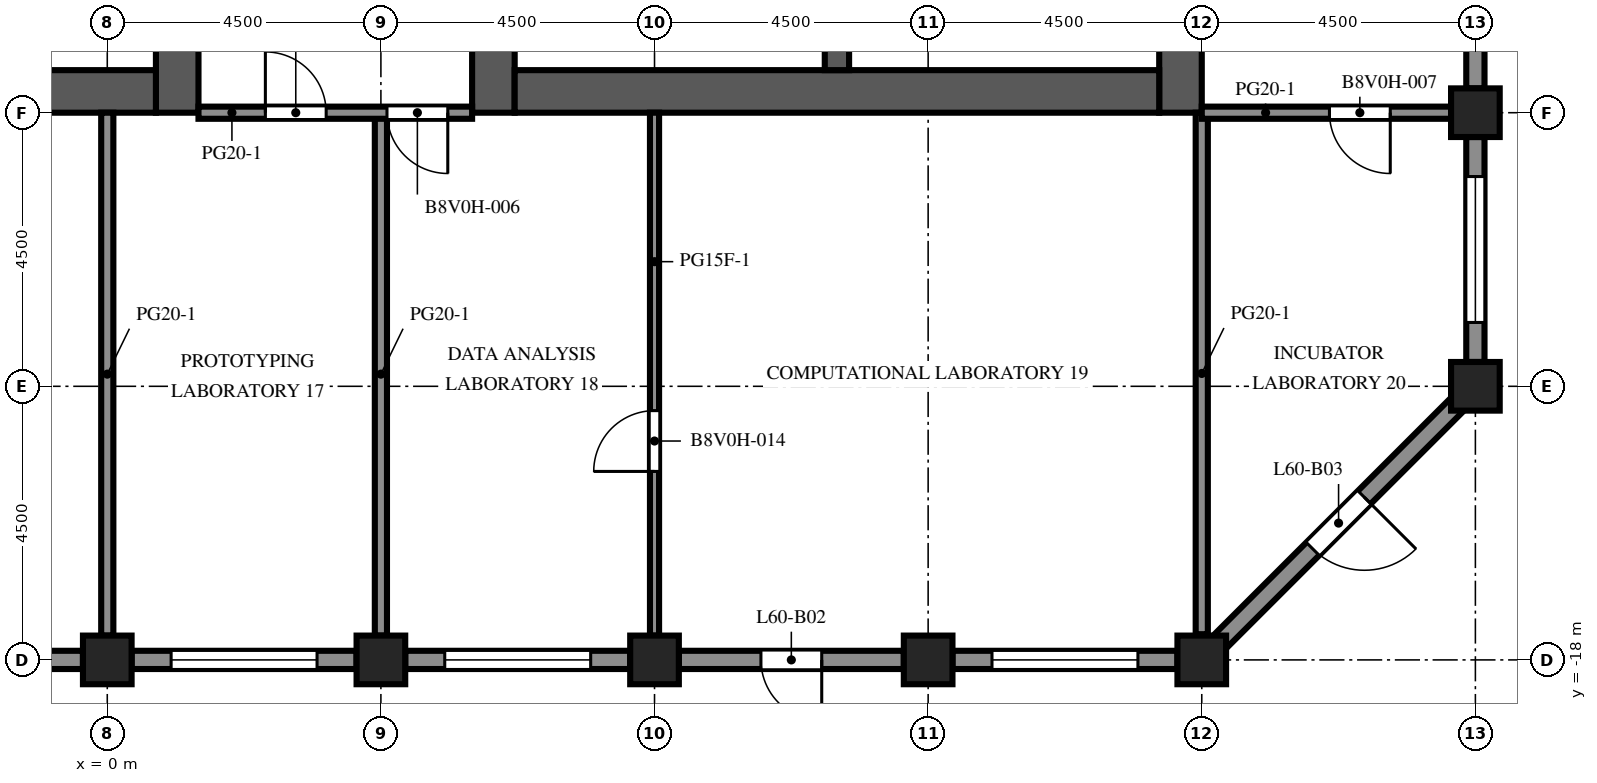
"""IFC4 building model, lengths in metres.
Left out: names, types, materials, properties, quantities, classifications, styles, units other than length and angle.
Written with IfcOpenShell. Run it as: python <this file> out.ifc"""

import sys

from ifc_helpers import new_model, si_unit, direction, frame, frame_2d, origin, origin_2d, place, context, subcontext, project, spatial, rectangle, extrude, element, fill, save


model = new_model("IFC4")
c1 = context("Model", 3, precision=1e-05, world=origin(), true_north=direction((0.0, 1.0)))
c2 = subcontext(c1, "Body", "Model", "MODEL_VIEW")
j1 = project(units=[si_unit("LENGTHUNIT", "METRE"), si_unit("PLANEANGLEUNIT", "RADIAN")], contexts=[c1])
p1 = place(None, origin())
s1 = spatial("IfcSite", under=j1, at=p1, CompositionType="ELEMENT")
p2 = place(p1, origin())
s2 = spatial("IfcBuilding", under=s1, at=p2, CompositionType="ELEMENT")
p3 = place(p2, frame((0.0, 0.0, 266.3)))
s3 = spatial("IfcBuildingStorey", under=s2, at=p3, CompositionType="ELEMENT", Elevation=266.3)
for number, where, z_axis, x_axis in (
    (1, (0.0, -18.0, -0.45), (0.0, 0.0, 1.0), (1.0, 0.0, 0.0)),
    (2, (4.5, -18.0, -0.45), (0.0, 0.0, 1.0), (1.0, 0.0, 0.0)),
    (3, (9.0, -18.0, -0.45), (0.0, 0.0, 1.0), (1.0, 0.0, 0.0)),
    (4, (13.5, -18.0, -0.45), (0.0, 0.0, 1.0), (1.0, 0.0, 0.0)),
    (5, (18.0, -18.0, -0.45), (0.0, 0.0, 1.0), (1.0, 0.0, 0.0)),
    (6, (22.5, -13.5, -0.45), (0.0, 0.0, 1.0), (1.0, 0.0, 0.0)),
    (7, (22.5, -9.0, -0.45), (0.0, 0.0, 1.0), (1.0, 0.0, 0.0)),
):
    element("IfcColumn", number, at=place(p3, frame(where, z_axis=z_axis, x_axis=x_axis)), inside=s3, PredefinedType="COLUMN", context=c2, shape_type="SweptSolid", body=[
        extrude(rectangle(XDim=0.8, YDim=0.8, at=origin_2d()), origin(), (0.0, 0.0, 1.0), 4.55),
    ])
p4 = place(p3, frame((1.15, -9.0, 0.0), z_axis=(0.0, 0.0, 1.0), x_axis=(0.0, 1.0, 0.0)))
e8 = element("IfcWall", 8, at=p4, inside=s3, PredefinedType="SHEAR", context=c2, shape_type="SweptSolid", body=[
    extrude(rectangle(XDim=27.5, YDim=0.7, at=frame_2d((13.75, 0.0))), origin(), (0.0, 0.0, 1.0), 4.1),
])
p5 = place(p4, frame((12.55, 0.0, 0.0)))
e9 = element("IfcOpeningElement", 9, at=p5, cuts=e8, PredefinedType="OPENING", context=c2, shape_type="SweptSolid", body=[
    extrude(rectangle(XDim=2.4, YDim=2.4, at=frame_2d((1.2, 1.2))), frame((0.0, 0.36, 0.0), z_axis=(0.0, -1.0, 0.0), x_axis=(1.0, 0.0, 0.0)), (0.0, 0.0, 1.0), 0.72),
])
p6 = place(p4, frame((3.788, 0.0, 0.0)))
e10 = element("IfcOpeningElement", 10, at=p6, cuts=e8, PredefinedType="OPENING", context=c2, shape_type="SweptSolid", body=[
    extrude(rectangle(XDim=0.968, YDim=2.1, at=frame_2d((0.484, 1.05))), frame((0.0, 0.36, 0.0), z_axis=(0.0, -1.0, 0.0), x_axis=(1.0, 0.0, 0.0)), (0.0, 0.0, 1.0), 0.72),
])
p7 = place(p4, frame((23.54, 0.0, 0.0)))
e11 = element("IfcOpeningElement", 11, at=p7, cuts=e8, PredefinedType="OPENING", context=c2, shape_type="SweptSolid", body=[
    extrude(rectangle(XDim=1.2, YDim=2.1, at=frame_2d((0.6, 1.05))), frame((0.0, 0.36, 0.0), z_axis=(0.0, -1.0, 0.0), x_axis=(1.0, 0.0, 0.0)), (0.0, 0.0, 1.0), 0.72),
])
p8 = place(p3, frame((-9.8, -8.65, 0.0), z_axis=(0.0, 0.0, 1.0), x_axis=(1.0, 0.0, 0.0)))
e12 = element("IfcWall", 12, at=p8, inside=s3, PredefinedType="SHEAR", context=c2, shape_type="SweptSolid", body=[
    extrude(rectangle(XDim=10.6, YDim=0.7, at=frame_2d((5.3, 0.0))), origin(), (0.0, 0.0, 1.0), 4.1),
])
p9 = place(p3, frame((6.35, -9.0, 0.0), z_axis=(0.0, 0.0, 1.0), x_axis=(0.0, 1.0, 0.0)))
e13 = element("IfcWall", 13, at=p9, inside=s3, PredefinedType="SHEAR", context=c2, shape_type="SweptSolid", body=[
    extrude(rectangle(XDim=27.5, YDim=0.7, at=frame_2d((13.75, 0.0))), origin(), (0.0, 0.0, 1.0), 4.1),
])
p10 = place(p9, frame((12.55, 0.0, 0.0)))
e14 = element("IfcOpeningElement", 14, at=p10, cuts=e13, PredefinedType="OPENING", context=c2, shape_type="SweptSolid", body=[
    extrude(rectangle(XDim=2.4, YDim=2.4, at=frame_2d((1.2, 1.2))), frame((0.0, 0.36, 0.0), z_axis=(0.0, -1.0, 0.0), x_axis=(1.0, 0.0, 0.0)), (0.0, 0.0, 1.0), 0.72),
])
p11 = place(p9, frame((3.788, 0.0, 0.0)))
e15 = element("IfcOpeningElement", 15, at=p11, cuts=e13, PredefinedType="OPENING", context=c2, shape_type="SweptSolid", body=[
    extrude(rectangle(XDim=0.968, YDim=2.1, at=frame_2d((0.484, 1.05))), frame((0.0, 0.36, 0.0), z_axis=(0.0, -1.0, 0.0), x_axis=(1.0, 0.0, 0.0)), (0.0, 0.0, 1.0), 0.72),
])
p12 = place(p9, frame((23.54, 0.0, 0.0)))
e16 = element("IfcOpeningElement", 16, at=p12, cuts=e13, PredefinedType="OPENING", context=c2, shape_type="SweptSolid", body=[
    extrude(rectangle(XDim=1.2, YDim=2.1, at=frame_2d((0.6, 1.05))), frame((0.0, 0.36, 0.0), z_axis=(0.0, -1.0, 0.0), x_axis=(1.0, 0.0, 0.0)), (0.0, 0.0, 1.0), 0.72),
])
p13 = place(p3, frame((17.65, -9.0, 0.0), z_axis=(0.0, 0.0, 1.0), x_axis=(0.0, 1.0, 0.0)))
e17 = element("IfcWall", 17, at=p13, inside=s3, PredefinedType="SHEAR", context=c2, shape_type="SweptSolid", body=[
    extrude(rectangle(XDim=27.5, YDim=0.7, at=frame_2d((13.75, 0.0))), origin(), (0.0, 0.0, 1.0), 4.1),
])
p14 = place(p13, frame((12.55, 0.0, 0.0)))
e18 = element("IfcOpeningElement", 18, at=p14, cuts=e17, PredefinedType="OPENING", context=c2, shape_type="SweptSolid", body=[
    extrude(rectangle(XDim=2.4, YDim=2.4, at=frame_2d((1.2, 1.2))), frame((0.0, 0.36, 0.0), z_axis=(0.0, -1.0, 0.0), x_axis=(1.0, 0.0, 0.0)), (0.0, 0.0, 1.0), 0.72),
])
p15 = place(p13, frame((6.825, 0.0, 0.0)))
e19 = element("IfcOpeningElement", 19, at=p15, cuts=e17, PredefinedType="OPENING", context=c2, shape_type="SweptSolid", body=[
    extrude(rectangle(XDim=1.2, YDim=2.1, at=frame_2d((0.6, 1.05))), frame((0.0, 0.36, 0.0), z_axis=(0.0, -1.0, 0.0), x_axis=(1.0, 0.0, 0.0)), (0.0, 0.0, 1.0), 0.72),
])
p16 = place(p13, frame((19.475, 0.0, 0.0)))
e20 = element("IfcOpeningElement", 20, at=p16, cuts=e17, PredefinedType="OPENING", context=c2, shape_type="SweptSolid", body=[
    extrude(rectangle(XDim=1.2, YDim=2.1, at=frame_2d((0.6, 1.05))), frame((0.0, 0.36, 0.0), z_axis=(0.0, -1.0, 0.0), x_axis=(1.0, 0.0, 0.0)), (0.0, 0.0, 1.0), 0.72),
])
p17 = place(p3, frame((6.7, -8.65, 0.0), z_axis=(0.0, 0.0, 1.0), x_axis=(1.0, 0.0, 0.0)))
e21 = element("IfcWall", 21, at=p17, inside=s3, PredefinedType="SHEAR", context=c2, shape_type="SweptSolid", body=[
    extrude(rectangle(XDim=10.6, YDim=0.7, at=frame_2d((5.3, 0.0))), origin(), (0.0, 0.0, 1.0), 4.1),
])
p18 = place(p3, frame((12.0, -8.3, 0.0), z_axis=(0.0, 0.0, 1.0), x_axis=(0.0, 1.0, 0.0)))
e22 = element("IfcWall", 22, at=p18, inside=s3, PredefinedType="SHEAR", context=c2, shape_type="SweptSolid", body=[
    extrude(rectangle(XDim=7.6, YDim=0.4, at=frame_2d((3.8, 0.0))), origin(), (0.0, 0.0, 1.0), 4.1),
])
p19 = place(p3, frame((-0.4, -18.0, 0.0), z_axis=(0.0, 0.0, 1.0), x_axis=(-1.0, 0.0, 0.0)))
e23 = element("IfcWall", 23, at=p19, inside=s3, PredefinedType="SOLIDWALL", context=c2, shape_type="SweptSolid", body=[
    extrude(rectangle(XDim=3.7, YDim=0.3, at=frame_2d((1.85, 0.0))), origin(), (0.0, 0.0, 1.0), 2.85),
])
p20 = place(p19, frame((0.65, 0.0, 0.8)))
e24 = element("IfcOpeningElement", 24, at=p20, cuts=e23, PredefinedType="OPENING", context=c2, shape_type="SweptSolid", body=[
    extrude(rectangle(XDim=2.4, YDim=1.7, at=frame_2d((1.2, 0.85))), frame((0.0, 0.16, 0.0), z_axis=(0.0, -1.0, 0.0), x_axis=(1.0, 0.0, 0.0)), (0.0, 0.0, 1.0), 0.32),
])
p21 = place(p3, frame((4.1, -18.0, 0.0), z_axis=(0.0, 0.0, 1.0), x_axis=(-1.0, 0.0, 0.0)))
e25 = element("IfcWall", 25, at=p21, inside=s3, PredefinedType="SOLIDWALL", context=c2, shape_type="SweptSolid", body=[
    extrude(rectangle(XDim=3.7, YDim=0.3, at=frame_2d((1.85, 0.0))), origin(), (0.0, 0.0, 1.0), 2.85),
])
p22 = place(p21, frame((0.65, 0.0, 0.8)))
e26 = element("IfcOpeningElement", 26, at=p22, cuts=e25, PredefinedType="OPENING", context=c2, shape_type="SweptSolid", body=[
    extrude(rectangle(XDim=2.4, YDim=1.7, at=frame_2d((1.2, 0.85))), frame((0.0, 0.16, 0.0), z_axis=(0.0, -1.0, 0.0), x_axis=(1.0, 0.0, 0.0)), (0.0, 0.0, 1.0), 0.32),
])
p23 = place(p3, frame((8.6, -18.0, 0.0), z_axis=(0.0, 0.0, 1.0), x_axis=(-1.0, 0.0, 0.0)))
e27 = element("IfcWall", 27, at=p23, inside=s3, PredefinedType="SOLIDWALL", context=c2, shape_type="SweptSolid", body=[
    extrude(rectangle(XDim=3.7, YDim=0.3, at=frame_2d((1.85, 0.0))), origin(), (0.0, 0.0, 1.0), 2.85),
])
p24 = place(p23, frame((0.65, 0.0, 0.8)))
e28 = element("IfcOpeningElement", 28, at=p24, cuts=e27, PredefinedType="OPENING", context=c2, shape_type="SweptSolid", body=[
    extrude(rectangle(XDim=2.4, YDim=1.7, at=frame_2d((1.2, 0.85))), frame((0.0, 0.16, 0.0), z_axis=(0.0, -1.0, 0.0), x_axis=(1.0, 0.0, 0.0)), (0.0, 0.0, 1.0), 0.32),
])
p25 = place(p3, frame((13.1, -18.0, 0.0), z_axis=(0.0, 0.0, 1.0), x_axis=(-1.0, 0.0, 0.0)))
e29 = element("IfcWall", 29, at=p25, inside=s3, PredefinedType="SOLIDWALL", context=c2, shape_type="SweptSolid", body=[
    extrude(rectangle(XDim=3.7, YDim=0.3, at=frame_2d((1.85, 0.0))), origin(), (0.0, 0.0, 1.0), 2.85),
])
p26 = place(p25, frame((1.35, 0.0, 0.0)))
e30 = element("IfcOpeningElement", 30, at=p26, cuts=e29, PredefinedType="OPENING", context=c2, shape_type="SweptSolid", body=[
    extrude(rectangle(XDim=1.0, YDim=2.2, at=frame_2d((0.5, 1.1))), frame((0.0, 0.16, 0.0), z_axis=(0.0, -1.0, 0.0), x_axis=(1.0, 0.0, 0.0)), (0.0, 0.0, 1.0), 0.32),
])
p27 = place(p3, frame((17.6, -18.0, 0.0), z_axis=(0.0, 0.0, 1.0), x_axis=(-1.0, 0.0, 0.0)))
e31 = element("IfcWall", 31, at=p27, inside=s3, PredefinedType="SOLIDWALL", context=c2, shape_type="SweptSolid", body=[
    extrude(rectangle(XDim=3.7, YDim=0.3, at=frame_2d((1.85, 0.0))), origin(), (0.0, 0.0, 1.0), 2.85),
])
p28 = place(p27, frame((0.65, 0.0, 0.8)))
e32 = element("IfcOpeningElement", 32, at=p28, cuts=e31, PredefinedType="OPENING", context=c2, shape_type="SweptSolid", body=[
    extrude(rectangle(XDim=2.4, YDim=1.7, at=frame_2d((1.2, 0.85))), frame((0.0, 0.16, 0.0), z_axis=(0.0, -1.0, 0.0), x_axis=(1.0, 0.0, 0.0)), (0.0, 0.0, 1.0), 0.32),
])
p29 = place(p3, frame((22.206, -13.794, 0.0), z_axis=(0.0, 0.0, 1.0), x_axis=(-0.707106781187, -0.707106781187, 0.0)))
e33 = element("IfcWall", 33, at=p29, inside=s3, PredefinedType="SOLIDWALL", context=c2, shape_type="SweptSolid", body=[
    extrude(rectangle(XDim=5.532, YDim=0.3, at=frame_2d((2.766, 0.0))), origin(), (0.0, 0.0, 1.0), 2.85),
])
p30 = place(p29, frame((2.166, 0.0, 0.0)))
e34 = element("IfcOpeningElement", 34, at=p30, cuts=e33, PredefinedType="OPENING", context=c2, shape_type="SweptSolid", body=[
    extrude(rectangle(XDim=1.2, YDim=2.2, at=frame_2d((0.6, 1.1))), frame((0.0, 0.16, 0.0), z_axis=(0.0, -1.0, 0.0), x_axis=(1.0, 0.0, 0.0)), (0.0, 0.0, 1.0), 0.32),
])
p31 = place(p3, frame((22.5, -9.4, 0.0), z_axis=(0.0, 0.0, 1.0), x_axis=(0.0, -1.0, 0.0)))
e35 = element("IfcWall", 35, at=p31, inside=s3, PredefinedType="SOLIDWALL", context=c2, shape_type="SweptSolid", body=[
    extrude(rectangle(XDim=3.7, YDim=0.3, at=frame_2d((1.85, 0.0))), origin(), (0.0, 0.0, 1.0), 2.85),
])
p32 = place(p31, frame((0.65, 0.0, 0.8)))
e36 = element("IfcOpeningElement", 36, at=p32, cuts=e35, PredefinedType="OPENING", context=c2, shape_type="SweptSolid", body=[
    extrude(rectangle(XDim=2.4, YDim=1.7, at=frame_2d((1.2, 0.85))), frame((0.0, 0.16, 0.0), z_axis=(0.0, -1.0, 0.0), x_axis=(1.0, 0.0, 0.0)), (0.0, 0.0, 1.0), 0.32),
])
p33 = place(p3, frame((22.5, -4.9, 0.0), z_axis=(0.0, 0.0, 1.0), x_axis=(0.0, -1.0, 0.0)))
e37 = element("IfcWall", 37, at=p33, inside=s3, PredefinedType="SOLIDWALL", context=c2, shape_type="SweptSolid", body=[
    extrude(rectangle(XDim=3.7, YDim=0.3, at=frame_2d((1.85, 0.0))), origin(), (0.0, 0.0, 1.0), 2.85),
])
p34 = place(p33, frame((1.35, 0.0, 0.0)))
e38 = element("IfcOpeningElement", 38, at=p34, cuts=e37, PredefinedType="OPENING", context=c2, shape_type="SweptSolid", body=[
    extrude(rectangle(XDim=1.0, YDim=2.2, at=frame_2d((0.5, 1.1))), frame((0.0, 0.16, 0.0), z_axis=(0.0, -1.0, 0.0), x_axis=(1.0, 0.0, 0.0)), (0.0, 0.0, 1.0), 0.32),
])
for number, where, z_axis, x_axis in (
    (39, (0.0, -17.6, 0.0), (0.0, 0.0, 1.0), (0.0, 1.0, 0.0)),
    (40, (4.5, -17.6, 0.0), (0.0, 0.0, 1.0), (0.0, 1.0, 0.0)),
):
    element("IfcWall", number, at=place(p3, frame(where, z_axis=z_axis, x_axis=x_axis)), inside=s3, PredefinedType="PARTITIONING", context=c2, shape_type="SweptSolid", body=[
        extrude(rectangle(XDim=8.6, YDim=0.2, at=frame_2d((4.3, 0.0))), origin(), (0.0, 0.0, 1.0), 3.65),
    ])
p35 = place(p3, frame((9.0, -9.0, 0.0), z_axis=(0.0, 0.0, 1.0), x_axis=(0.0, -1.0, 0.0)))
e41 = element("IfcWall", 41, at=p35, inside=s3, PredefinedType="PARTITIONING", context=c2, shape_type="SweptSolid", body=[
    extrude(rectangle(XDim=8.6, YDim=0.15, at=frame_2d((4.3, 0.0))), origin(), (0.0, 0.0, 1.0), 3.65),
])
p36 = place(p35, frame((4.9, 0.0, 0.0)))
e42 = element("IfcOpeningElement", 42, at=p36, cuts=e41, PredefinedType="OPENING", context=c2, shape_type="SweptSolid", body=[
    extrude(rectangle(XDim=1.0, YDim=2.1, at=frame_2d((0.5, 1.05))), frame((0.0, 0.085, 0.0), z_axis=(0.0, -1.0, 0.0), x_axis=(1.0, 0.0, 0.0)), (0.0, 0.0, 1.0), 0.17),
])
p37 = place(p3, frame((18.0, -17.577, 0.0), z_axis=(0.0, 0.0, 1.0), x_axis=(0.0, 1.0, 0.0)))
e43 = element("IfcWall", 43, at=p37, inside=s3, PredefinedType="PARTITIONING", context=c2, shape_type="SweptSolid", body=[
    extrude(rectangle(XDim=8.577, YDim=0.2, at=frame_2d((4.289, 0.0))), origin(), (0.0, 0.0, 1.0), 3.65),
])
p38 = place(p3, frame((6.0, -9.0, 0.0), z_axis=(0.0, 0.0, 1.0), x_axis=(-1.0, 0.0, 0.0)))
e44 = element("IfcWall", 44, at=p38, inside=s3, PredefinedType="PARTITIONING", context=c2, shape_type="SweptSolid", body=[
    extrude(rectangle(XDim=4.5, YDim=0.2, at=frame_2d((2.25, 0.0))), origin(), (0.0, 0.0, 1.0), 3.65),
])
p39 = place(p38, frame((2.4, 0.0, 0.0)))
e45 = element("IfcOpeningElement", 45, at=p39, cuts=e44, PredefinedType="OPENING", context=c2, shape_type="SweptSolid", body=[
    extrude(rectangle(XDim=1.0, YDim=2.1, at=frame_2d((0.5, 1.05))), frame((0.0, 0.11, 0.0), z_axis=(0.0, -1.0, 0.0), x_axis=(1.0, 0.0, 0.0)), (0.0, 0.0, 1.0), 0.22),
])
p40 = place(p38, frame((0.4, 0.0, 0.0)))
e46 = element("IfcOpeningElement", 46, at=p40, cuts=e44, PredefinedType="OPENING", context=c2, shape_type="SweptSolid", body=[
    extrude(rectangle(XDim=1.0, YDim=2.1, at=frame_2d((0.5, 1.05))), frame((0.0, 0.11, 0.0), z_axis=(0.0, -1.0, 0.0), x_axis=(1.0, 0.0, 0.0)), (0.0, 0.0, 1.0), 0.22),
])
p41 = place(p3, frame((22.1, -9.0, 0.0), z_axis=(0.0, 0.0, 1.0), x_axis=(-1.0, 0.0, 0.0)))
e47 = element("IfcWall", 47, at=p41, inside=s3, PredefinedType="PARTITIONING", context=c2, shape_type="SweptSolid", body=[
    extrude(rectangle(XDim=4.1, YDim=0.2, at=frame_2d((2.05, 0.0))), origin(), (0.0, 0.0, 1.0), 3.65),
])
p42 = place(p41, frame((1.0, 0.0, 0.0)))
e48 = element("IfcOpeningElement", 48, at=p42, cuts=e47, PredefinedType="OPENING", context=c2, shape_type="SweptSolid", body=[
    extrude(rectangle(XDim=1.0, YDim=2.1, at=frame_2d((0.5, 1.05))), frame((0.0, 0.11, 0.0), z_axis=(0.0, -1.0, 0.0), x_axis=(1.0, 0.0, 0.0)), (0.0, 0.0, 1.0), 0.22),
])
p43 = place(p22, origin())
e49 = element("IfcWindow", 49, at=p43, inside=s3, PartitioningType="SINGLE_PANEL", PredefinedType="WINDOW", context=c2, shape_type="SweptSolid", body=[
    extrude(rectangle(XDim=2.4, YDim=1.7, at=frame_2d((1.2, 0.85))), frame((0.0, 0.03, 0.0), z_axis=(0.0, -1.0, 0.0), x_axis=(1.0, 0.0, 0.0)), (0.0, 0.0, 1.0), 0.06),
])
fill(e26, e49)
p44 = place(p24, origin())
e50 = element("IfcWindow", 50, at=p44, inside=s3, PartitioningType="SINGLE_PANEL", PredefinedType="WINDOW", context=c2, shape_type="SweptSolid", body=[
    extrude(rectangle(XDim=2.4, YDim=1.7, at=frame_2d((1.2, 0.85))), frame((0.0, 0.03, 0.0), z_axis=(0.0, -1.0, 0.0), x_axis=(1.0, 0.0, 0.0)), (0.0, 0.0, 1.0), 0.06),
])
fill(e28, e50)
p45 = place(p26, origin())
e51 = element("IfcDoor", 51, at=p45, inside=s3, OperationType="SINGLE_SWING_LEFT", PredefinedType="DOOR", context=c2, shape_type="SweptSolid", body=[
    extrude(rectangle(XDim=1.0, YDim=2.2, at=frame_2d((0.5, 1.1))), frame((0.0, 0.025, 0.0), z_axis=(0.0, -1.0, 0.0), x_axis=(1.0, 0.0, 0.0)), (0.0, 0.0, 1.0), 0.05),
])
fill(e30, e51)
p46 = place(p28, origin())
e52 = element("IfcWindow", 52, at=p46, inside=s3, PartitioningType="SINGLE_PANEL", PredefinedType="WINDOW", context=c2, shape_type="SweptSolid", body=[
    extrude(rectangle(XDim=2.4, YDim=1.7, at=frame_2d((1.2, 0.85))), frame((0.0, 0.03, 0.0), z_axis=(0.0, -1.0, 0.0), x_axis=(1.0, 0.0, 0.0)), (0.0, 0.0, 1.0), 0.06),
])
fill(e32, e52)
p47 = place(p30, origin())
e53 = element("IfcDoor", 53, at=p47, inside=s3, OperationType="SINGLE_SWING_LEFT", PredefinedType="DOOR", context=c2, shape_type="SweptSolid", body=[
    extrude(rectangle(XDim=1.2, YDim=2.2, at=frame_2d((0.6, 1.1))), frame((0.0, 0.025, 0.0), z_axis=(0.0, -1.0, 0.0), x_axis=(1.0, 0.0, 0.0)), (0.0, 0.0, 1.0), 0.05),
])
fill(e34, e53)
p48 = place(p32, origin())
e54 = element("IfcWindow", 54, at=p48, inside=s3, PartitioningType="SINGLE_PANEL", PredefinedType="WINDOW", context=c2, shape_type="SweptSolid", body=[
    extrude(rectangle(XDim=2.4, YDim=1.7, at=frame_2d((1.2, 0.85))), frame((0.0, 0.03, 0.0), z_axis=(0.0, -1.0, 0.0), x_axis=(1.0, 0.0, 0.0)), (0.0, 0.0, 1.0), 0.06),
])
fill(e36, e54)
p49 = place(p39, origin())
e55 = element("IfcDoor", 55, at=p49, inside=s3, OperationType="SINGLE_SWING_RIGHT", PredefinedType="DOOR", context=c2, shape_type="SweptSolid", body=[
    extrude(rectangle(XDim=1.0, YDim=2.1, at=frame_2d((0.5, 1.05))), frame((0.0, 0.025, 0.0), z_axis=(0.0, -1.0, 0.0), x_axis=(1.0, 0.0, 0.0)), (0.0, 0.0, 1.0), 0.05),
])
fill(e45, e55)
p50 = place(p40, origin())
e56 = element("IfcDoor", 56, at=p50, inside=s3, OperationType="SINGLE_SWING_LEFT", PredefinedType="DOOR", context=c2, shape_type="SweptSolid", body=[
    extrude(rectangle(XDim=1.0, YDim=2.1, at=frame_2d((0.5, 1.05))), frame((0.0, 0.025, 0.0), z_axis=(0.0, -1.0, 0.0), x_axis=(1.0, 0.0, 0.0)), (0.0, 0.0, 1.0), 0.05),
])
fill(e46, e56)
p51 = place(p42, origin())
e57 = element("IfcDoor", 57, at=p51, inside=s3, OperationType="SINGLE_SWING_LEFT", PredefinedType="DOOR", context=c2, shape_type="SweptSolid", body=[
    extrude(rectangle(XDim=1.0, YDim=2.1, at=frame_2d((0.5, 1.05))), frame((0.0, 0.025, 0.0), z_axis=(0.0, -1.0, 0.0), x_axis=(1.0, 0.0, 0.0)), (0.0, 0.0, 1.0), 0.05),
])
fill(e48, e57)
p52 = place(p36, origin())
e58 = element("IfcDoor", 58, at=p52, inside=s3, OperationType="SINGLE_SWING_RIGHT", PredefinedType="DOOR", context=c2, shape_type="SweptSolid", body=[
    extrude(rectangle(XDim=1.0, YDim=2.1, at=frame_2d((0.5, 1.05))), frame((0.0, 0.025, 0.0), z_axis=(0.0, -1.0, 0.0), x_axis=(1.0, 0.0, 0.0)), (0.0, 0.0, 1.0), 0.05),
])
fill(e42, e58)
save(model, sys.argv[1])
